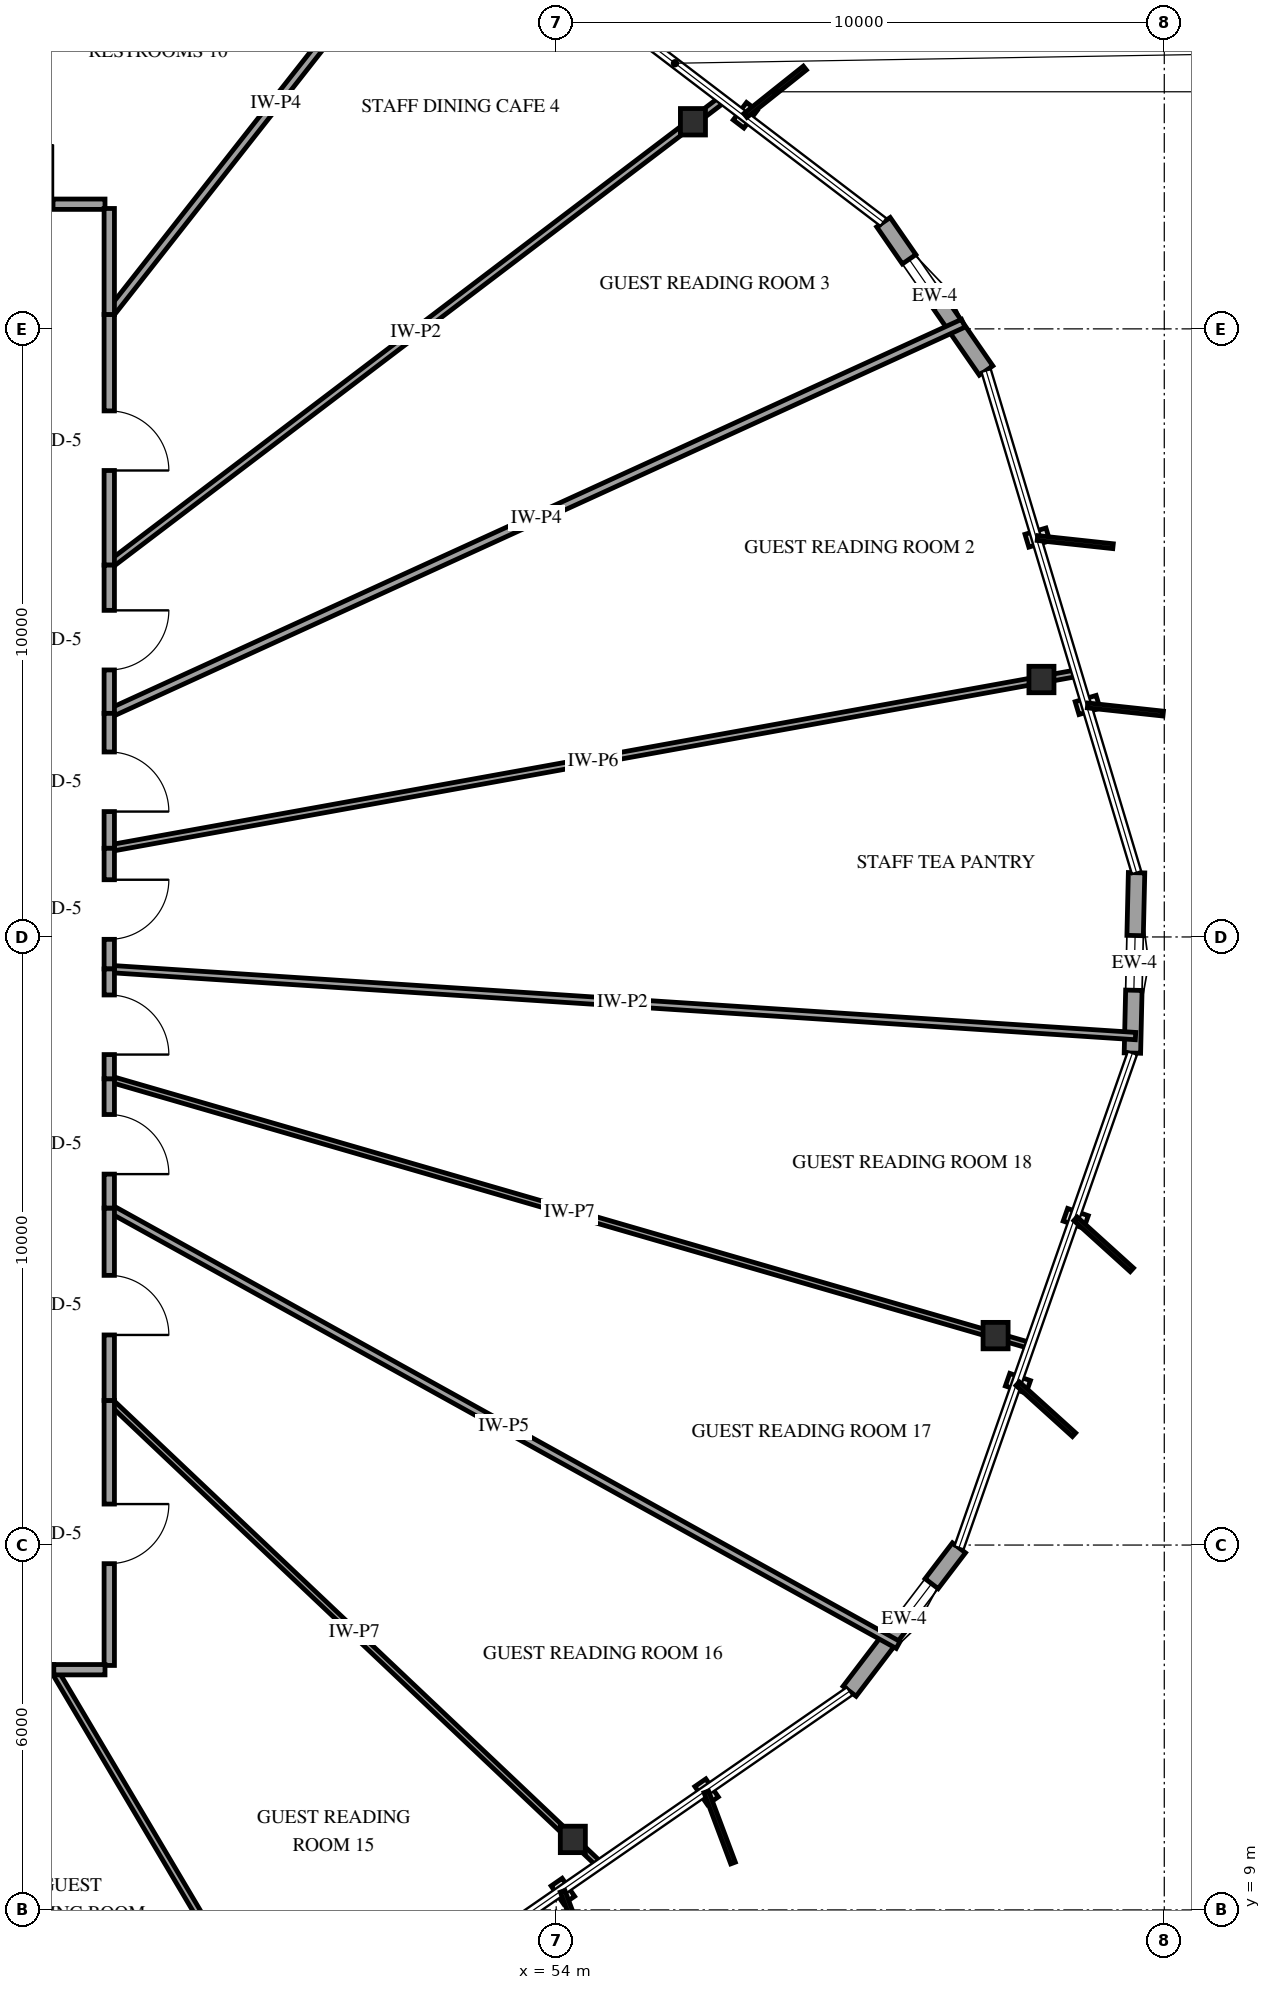
"""IFC4 building model, lengths in metres.
Left out: names, types, materials, properties, quantities, classifications, styles, units other than length and angle.
Written with IfcOpenShell. Run it as: python <this file> out.ifc"""

import sys

from ifc_helpers import new_model, si_unit, direction, frame, frame_2d, origin, origin_2d, place, context, subcontext, project, spatial, rectangle, i_section, extrude, element, fill, save


model = new_model("IFC4")
c1 = context("Model", 3, precision=1e-05, world=origin(), true_north=direction((0.0, 1.0)))
c2 = subcontext(c1, "Body", "Model", "MODEL_VIEW")
j1 = project(units=[si_unit("LENGTHUNIT", "METRE"), si_unit("PLANEANGLEUNIT", "RADIAN")], contexts=[c1])
p1 = place(None, origin())
s1 = spatial("IfcSite", under=j1, at=p1, CompositionType="ELEMENT")
p2 = place(p1, origin())
s2 = spatial("IfcBuilding", under=s1, at=p2, CompositionType="ELEMENT")
p3 = place(p2, frame((0.0, 0.0, 160.6)))
s3 = spatial("IfcBuildingStorey", under=s2, at=p3, CompositionType="ELEMENT", Elevation=160.6)
for number, where, z_axis, x_axis in (
    (1, (61.98, 29.234, 0.0), (0.0, 0.0, 1.0), (1.0, 0.0, 0.0)),
    (2, (56.249, 38.406, 0.0), (0.0, 0.0, 1.0), (1.0, 0.0, 0.0)),
    (3, (54.274, 10.159, 0.0), (0.0, 0.0, 1.0), (1.0, 0.0, 0.0)),
    (4, (61.226, 18.444, 0.0), (0.0, 0.0, 1.0), (1.0, 0.0, 0.0)),
):
    element("IfcColumn", number, at=place(p3, frame(where, z_axis=z_axis, x_axis=x_axis)), inside=s3, PredefinedType="COLUMN", context=c2, shape_type="SweptSolid", body=[
        extrude(i_section(OverallWidth=0.412, OverallDepth=0.435, WebThickness=0.036, FlangeThickness=0.057, FilletRadius=0.038, at=origin_2d()), origin(), (0.0, 0.0, 1.0), 3.6),
    ])
p4 = place(p3, frame((58.825, 12.595, 0.0), z_axis=(0.0, 0.0, 1.0), x_axis=(0.606288663224, 0.795244652196, 0.0)))
e5 = element("IfcWall", 5, at=p4, inside=s3, PredefinedType="SOLIDWALL", context=c2, shape_type="SweptSolid", body=[
    extrude(rectangle(XDim=2.967, YDim=0.27, at=frame_2d((1.483, 0.0))), origin(), (0.0, 0.0, 1.0), 2.679),
])
p5 = place(p4, frame((1.325, 0.0, 0.75)))
e6 = element("IfcOpeningElement", 6, at=p5, cuts=e5, PredefinedType="OPENING", context=c2, shape_type="SweptSolid", body=[
    extrude(rectangle(XDim=0.9, YDim=1.5, at=frame_2d((0.45, 0.75))), frame((0.0, 0.145, 0.0), z_axis=(0.0, -1.0, 0.0), x_axis=(1.0, 0.0, 0.0)), (0.0, 0.0, 1.0), 0.29),
])
p6 = place(p3, frame((63.476, 23.091, 0.0), z_axis=(0.0, 0.0, 1.0), x_axis=(0.023042941499, 0.999734476172, 0.0)))
e7 = element("IfcWall", 7, at=p6, inside=s3, PredefinedType="SOLIDWALL", context=c2, shape_type="SweptSolid", body=[
    extrude(rectangle(XDim=2.967, YDim=0.27, at=frame_2d((1.483, 0.0))), origin(), (0.0, 0.0, 1.0), 2.679),
])
p7 = place(p6, frame((1.033, 0.0, 0.75)))
e8 = element("IfcOpeningElement", 8, at=p7, cuts=e7, PredefinedType="OPENING", context=c2, shape_type="SweptSolid", body=[
    extrude(rectangle(XDim=0.9, YDim=1.5, at=frame_2d((0.45, 0.75))), frame((0.0, 0.145, 0.0), z_axis=(0.0, -1.0, 0.0), x_axis=(1.0, 0.0, 0.0)), (0.0, 0.0, 1.0), 0.29),
])
p8 = place(p3, frame((61.07, 34.315, 0.0), z_axis=(0.0, 0.0, 1.0), x_axis=(-0.569013104062, 0.822328454698, 0.0)))
e9 = element("IfcWall", 9, at=p8, inside=s3, PredefinedType="SOLIDWALL", context=c2, shape_type="SweptSolid", body=[
    extrude(rectangle(XDim=2.967, YDim=0.27, at=frame_2d((1.483, 0.0))), origin(), (0.0, 0.0, 1.0), 2.679),
])
p9 = place(p8, frame((1.325, 0.0, 0.75)))
e10 = element("IfcOpeningElement", 10, at=p9, cuts=e9, PredefinedType="OPENING", context=c2, shape_type="SweptSolid", body=[
    extrude(rectangle(XDim=0.9, YDim=1.5, at=frame_2d((0.45, 0.75))), frame((0.0, 0.145, 0.0), z_axis=(0.0, -1.0, 0.0), x_axis=(1.0, 0.0, 0.0)), (0.0, 0.0, 1.0), 0.29),
])
p10 = place(p3, frame((63.527, 23.37, 0.0), z_axis=(0.0, 0.0, 1.0), x_axis=(-0.997867350215, 0.065274431247, 0.0)))
e11 = element("IfcWall", 11, at=p10, inside=s3, PredefinedType="PARTITIONING", context=c2, shape_type="SweptSolid", body=[
    extrude(rectangle(XDim=16.913, YDim=0.12, at=frame_2d((8.457, 0.0))), origin(), (0.0, 0.0, 1.0), 3.3),
])
p11 = place(p3, frame((46.65, 26.458, 0.0), z_axis=(0.0, 0.0, 1.0), x_axis=(0.984011648358, 0.178104115326, 0.0)))
e12 = element("IfcWall", 12, at=p11, inside=s3, PredefinedType="PARTITIONING", context=c2, shape_type="SweptSolid", body=[
    extrude(rectangle(XDim=16.17, YDim=0.11, at=frame_2d((8.085, 0.0))), origin(), (0.0, 0.0, 1.0), 2.595),
])
p12 = place(p3, frame((46.65, 22.668, 0.0), z_axis=(0.0, 0.0, 1.0), x_axis=(0.960491510773, -0.278309284308, 0.0)))
e13 = element("IfcWall", 13, at=p12, inside=s3, PredefinedType="PARTITIONING", context=c2, shape_type="SweptSolid", body=[
    extrude(rectangle(XDim=15.763, YDim=0.1, at=frame_2d((7.881, 0.0))), origin(), (0.0, 0.0, 1.0), 3.3),
])
p13 = place(p3, frame((46.65, 28.677, 0.0), z_axis=(0.0, 0.0, 1.0), x_axis=(0.909587862055, 0.415511637866, 0.0)))
e14 = element("IfcWall", 14, at=p13, inside=s3, PredefinedType="PARTITIONING", context=c2, shape_type="SweptSolid", body=[
    extrude(rectangle(XDim=15.441, YDim=0.14, at=frame_2d((7.721, 0.0))), origin(), (0.0, 0.0, 1.0), 3.3),
])
p14 = place(p3, frame((46.65, 20.542, 0.0), z_axis=(0.0, 0.0, 1.0), x_axis=(0.874793288303, -0.484496339244, 0.0)))
e15 = element("IfcWall", 15, at=p14, inside=s3, PredefinedType="PARTITIONING", context=c2, shape_type="SweptSolid", body=[
    extrude(rectangle(XDim=14.83, YDim=0.13, at=frame_2d((7.415, 0.0))), origin(), (0.0, 0.0, 1.0), 3.3),
])
p15 = place(p3, frame((46.65, 31.115, 0.0), z_axis=(0.0, 0.0, 1.0), x_axis=(0.796320074683, 0.604875473678, 0.0)))
e16 = element("IfcWall", 16, at=p15, inside=s3, PredefinedType="PARTITIONING", context=c2, shape_type="SweptSolid", body=[
    extrude(rectangle(XDim=12.662, YDim=0.12, at=frame_2d((6.331, 0.0))), origin(), (0.0, 0.0, 1.0), 3.3),
])
p16 = place(p3, frame((46.65, 17.378, 0.0), z_axis=(0.0, 0.0, 1.0), x_axis=(0.726135317292, -0.687551816943, 0.0)))
e17 = element("IfcWall", 17, at=p16, inside=s3, PredefinedType="PARTITIONING", context=c2, shape_type="SweptSolid", body=[
    extrude(rectangle(XDim=11.099, YDim=0.1, at=frame_2d((5.549, 0.0))), origin(), (0.0, 0.0, 1.0), 2.595),
])
p17 = place(p3, frame((46.65, 35.237, 0.0), z_axis=(0.0, 0.0, 1.0), x_axis=(0.618157544568, 0.786054228469, 0.0)))
e18 = element("IfcWall", 18, at=p17, inside=s3, PredefinedType="PARTITIONING", context=c2, shape_type="SweptSolid", body=[
    extrude(rectangle(XDim=8.855, YDim=0.14, at=frame_2d((4.428, 0.0))), origin(), (0.0, 0.0, 1.0), 2.678),
])
p18 = place(p3, frame((45.738, 12.95, 0.0), z_axis=(0.0, 0.0, 1.0), x_axis=(0.50979858573, -0.860293788184, 0.0)))
e19 = element("IfcWall", 19, at=p18, inside=s3, PredefinedType="PARTITIONING", context=c2, shape_type="SweptSolid", body=[
    extrude(rectangle(XDim=7.036, YDim=0.11, at=frame_2d((3.518, 0.0))), origin(), (0.0, 0.0, 1.0), 2.678),
])
p19 = place(p3, frame((43.86, 37.05, 0.0), z_axis=(0.0, 0.0, 1.0), x_axis=(0.400079710806, 0.916480346217, 0.0)))
e20 = element("IfcWall", 20, at=p19, inside=s3, PredefinedType="PARTITIONING", context=c2, shape_type="SweptSolid", body=[
    extrude(rectangle(XDim=6.534, YDim=0.14, at=frame_2d((3.267, 0.0))), origin(), (0.0, 0.0, 1.0), 2.595),
])
p20 = place(p3, frame((46.65, 17.378, 0.0), z_axis=(0.0, 0.0, 1.0), x_axis=(0.0, -1.0, 0.0)))
e21 = element("IfcWall", 21, at=p20, inside=s3, PredefinedType="PARTITIONING", context=c2, shape_type="SweptSolid", body=[
    extrude(rectangle(XDim=4.358, YDim=0.17, at=frame_2d((2.179, 0.0))), origin(), (0.0, 0.0, 1.0), 3.3),
])
p21 = place(p20, frame((1.704, 0.0, 0.0)))
e22 = element("IfcOpeningElement", 22, at=p21, cuts=e21, PredefinedType="OPENING", context=c2, shape_type="SweptSolid", body=[
    extrude(rectangle(XDim=0.98, YDim=2.15, at=frame_2d((0.49, 1.075))), frame((0.0, 0.095, 0.0), z_axis=(0.0, -1.0, 0.0), x_axis=(1.0, 0.0, 0.0)), (0.0, 0.0, 1.0), 0.19),
])
p22 = place(p3, frame((46.65, 35.237, 0.0), z_axis=(0.0, 0.0, 1.0), x_axis=(0.0, -1.0, 0.0)))
e23 = element("IfcWall", 23, at=p22, inside=s3, PredefinedType="PARTITIONING", context=c2, shape_type="SweptSolid", body=[
    extrude(rectangle(XDim=4.122, YDim=0.17, at=frame_2d((2.061, 0.0))), origin(), (0.0, 0.0, 1.0), 3.3),
])
p23 = place(p22, frame((1.586, 0.0, 0.0)))
e24 = element("IfcOpeningElement", 24, at=p23, cuts=e23, PredefinedType="OPENING", context=c2, shape_type="SweptSolid", body=[
    extrude(rectangle(XDim=0.98, YDim=2.15, at=frame_2d((0.49, 1.075))), frame((0.0, 0.095, 0.0), z_axis=(0.0, -1.0, 0.0), x_axis=(1.0, 0.0, 0.0)), (0.0, 0.0, 1.0), 0.19),
])
p24 = place(p3, frame((46.65, 20.542, 0.0), z_axis=(0.0, 0.0, 1.0), x_axis=(0.0, -1.0, 0.0)))
e25 = element("IfcWall", 25, at=p24, inside=s3, PredefinedType="PARTITIONING", context=c2, shape_type="SweptSolid", body=[
    extrude(rectangle(XDim=3.164, YDim=0.17, at=frame_2d((1.582, 0.0))), origin(), (0.0, 0.0, 1.0), 3.3),
])
p25 = place(p24, frame((1.107, 0.0, 0.0)))
e26 = element("IfcOpeningElement", 26, at=p25, cuts=e25, PredefinedType="OPENING", context=c2, shape_type="SweptSolid", body=[
    extrude(rectangle(XDim=0.98, YDim=2.15, at=frame_2d((0.49, 1.075))), frame((0.0, 0.095, 0.0), z_axis=(0.0, -1.0, 0.0), x_axis=(1.0, 0.0, 0.0)), (0.0, 0.0, 1.0), 0.19),
])
p26 = place(p3, frame((43.86, 37.05, 0.0), z_axis=(0.0, 0.0, 1.0), x_axis=(1.0, 0.0, 0.0)))
e27 = element("IfcWall", 27, at=p26, inside=s3, PredefinedType="PARTITIONING", context=c2, shape_type="SweptSolid", body=[
    extrude(rectangle(XDim=2.72, YDim=0.17, at=frame_2d((1.36, 0.0))), origin(), (0.0, 0.0, 1.0), 3.3),
])
p27 = place(p26, frame((0.885, 0.0, 0.0)))
e28 = element("IfcOpeningElement", 28, at=p27, cuts=e27, PredefinedType="OPENING", context=c2, shape_type="SweptSolid", body=[
    extrude(rectangle(XDim=0.98, YDim=2.15, at=frame_2d((0.49, 1.075))), frame((0.0, 0.095, 0.0), z_axis=(0.0, -1.0, 0.0), x_axis=(1.0, 0.0, 0.0)), (0.0, 0.0, 1.0), 0.19),
])
p28 = place(p3, frame((45.738, 12.95, 0.0), z_axis=(0.0, 0.0, 1.0), x_axis=(-1.0, 0.0, 0.0)))
e29 = element("IfcWall", 29, at=p28, inside=s3, PredefinedType="PARTITIONING", context=c2, shape_type="SweptSolid", body=[
    extrude(rectangle(XDim=2.468, YDim=0.17, at=frame_2d((1.234, 0.0))), origin(), (0.0, 0.0, 1.0), 3.3),
])
p29 = place(p3, frame((46.65, 31.115, 0.0), z_axis=(0.0, 0.0, 1.0), x_axis=(0.0, -1.0, 0.0)))
e30 = element("IfcWall", 30, at=p29, inside=s3, PredefinedType="PARTITIONING", context=c2, shape_type="SweptSolid", body=[
    extrude(rectangle(XDim=2.438, YDim=0.17, at=frame_2d((1.219, 0.0))), origin(), (0.0, 0.0, 1.0), 3.3),
])
p30 = place(p29, frame((0.744, 0.0, 0.0)))
e31 = element("IfcOpeningElement", 31, at=p30, cuts=e30, PredefinedType="OPENING", context=c2, shape_type="SweptSolid", body=[
    extrude(rectangle(XDim=0.98, YDim=2.15, at=frame_2d((0.49, 1.075))), frame((0.0, 0.095, 0.0), z_axis=(0.0, -1.0, 0.0), x_axis=(1.0, 0.0, 0.0)), (0.0, 0.0, 1.0), 0.19),
])
p31 = place(p3, frame((46.65, 28.677, 0.0), z_axis=(0.0, 0.0, 1.0), x_axis=(0.0, -1.0, 0.0)))
e32 = element("IfcWall", 32, at=p31, inside=s3, PredefinedType="PARTITIONING", context=c2, shape_type="SweptSolid", body=[
    extrude(rectangle(XDim=2.219, YDim=0.17, at=frame_2d((1.109, 0.0))), origin(), (0.0, 0.0, 1.0), 3.3),
])
p32 = place(p31, frame((0.635, 0.0, 0.0)))
e33 = element("IfcOpeningElement", 33, at=p32, cuts=e32, PredefinedType="OPENING", context=c2, shape_type="SweptSolid", body=[
    extrude(rectangle(XDim=0.98, YDim=2.15, at=frame_2d((0.49, 1.075))), frame((0.0, 0.095, 0.0), z_axis=(0.0, -1.0, 0.0), x_axis=(1.0, 0.0, 0.0)), (0.0, 0.0, 1.0), 0.19),
])
p33 = place(p3, frame((46.65, 22.668, 0.0), z_axis=(0.0, 0.0, 1.0), x_axis=(0.0, -1.0, 0.0)))
e34 = element("IfcWall", 34, at=p33, inside=s3, PredefinedType="PARTITIONING", context=c2, shape_type="SweptSolid", body=[
    extrude(rectangle(XDim=2.126, YDim=0.17, at=frame_2d((1.063, 0.0))), origin(), (0.0, 0.0, 1.0), 3.3),
])
p34 = place(p33, frame((0.588, 0.0, 0.0)))
e35 = element("IfcOpeningElement", 35, at=p34, cuts=e34, PredefinedType="OPENING", context=c2, shape_type="SweptSolid", body=[
    extrude(rectangle(XDim=0.98, YDim=2.15, at=frame_2d((0.49, 1.075))), frame((0.0, 0.095, 0.0), z_axis=(0.0, -1.0, 0.0), x_axis=(1.0, 0.0, 0.0)), (0.0, 0.0, 1.0), 0.19),
])
p35 = place(p3, frame((46.65, 26.458, 0.0), z_axis=(0.0, 0.0, 1.0), x_axis=(0.0, -1.0, 0.0)))
e36 = element("IfcWall", 36, at=p35, inside=s3, PredefinedType="PARTITIONING", context=c2, shape_type="SweptSolid", body=[
    extrude(rectangle(XDim=1.984, YDim=0.17, at=frame_2d((0.992, 0.0))), origin(), (0.0, 0.0, 1.0), 3.3),
])
p36 = place(p35, frame((0.517, 0.0, 0.0)))
e37 = element("IfcOpeningElement", 37, at=p36, cuts=e36, PredefinedType="OPENING", context=c2, shape_type="SweptSolid", body=[
    extrude(rectangle(XDim=0.98, YDim=2.15, at=frame_2d((0.49, 1.075))), frame((0.0, 0.095, 0.0), z_axis=(0.0, -1.0, 0.0), x_axis=(1.0, 0.0, 0.0)), (0.0, 0.0, 1.0), 0.19),
])
p37 = place(p3, frame((46.65, 24.474, 0.0), z_axis=(0.0, 0.0, 1.0), x_axis=(0.0, -1.0, 0.0)))
e38 = element("IfcWall", 38, at=p37, inside=s3, PredefinedType="PARTITIONING", context=c2, shape_type="SweptSolid", body=[
    extrude(rectangle(XDim=1.806, YDim=0.17, at=frame_2d((0.903, 0.0))), origin(), (0.0, 0.0, 1.0), 3.3),
])
p38 = place(p37, frame((0.428, 0.0, 0.0)))
e39 = element("IfcOpeningElement", 39, at=p38, cuts=e38, PredefinedType="OPENING", context=c2, shape_type="SweptSolid", body=[
    extrude(rectangle(XDim=0.98, YDim=2.15, at=frame_2d((0.49, 1.075))), frame((0.0, 0.095, 0.0), z_axis=(0.0, -1.0, 0.0), x_axis=(1.0, 0.0, 0.0)), (0.0, 0.0, 1.0), 0.19),
])
p39 = place(p3, frame((46.65, 36.98, 0.0), z_axis=(0.0, 0.0, 1.0), x_axis=(0.0, -1.0, 0.0)))
e40 = element("IfcWall", 40, at=p39, inside=s3, PredefinedType="PARTITIONING", context=c2, shape_type="SweptSolid", body=[
    extrude(rectangle(XDim=1.743, YDim=0.17, at=frame_2d((0.872, 0.0))), origin(), (0.0, 0.0, 1.0), 3.3),
])
p40 = place(p3, frame((46.58, 12.95, 0.0), z_axis=(0.0, 0.0, 1.0), x_axis=(-1.0, 0.0, 0.0)))
e41 = element("IfcWall", 41, at=p40, inside=s3, PredefinedType="PARTITIONING", context=c2, shape_type="SweptSolid", body=[
    extrude(rectangle(XDim=0.842, YDim=0.17, at=frame_2d((0.421, 0.0))), origin(), (0.0, 0.0, 1.0), 3.3),
])
p41 = place(p5, origin())
e42 = element("IfcWindow", 42, at=p41, inside=s3, PartitioningType="SINGLE_PANEL", PredefinedType="WINDOW", context=c2, shape_type="SweptSolid", body=[
    extrude(rectangle(XDim=0.9, YDim=1.5, at=frame_2d((0.45, 0.75))), frame((0.0, 0.03, 0.0), z_axis=(0.0, -1.0, 0.0), x_axis=(1.0, 0.0, 0.0)), (0.0, 0.0, 1.0), 0.06),
])
fill(e6, e42)
p42 = place(p7, origin())
e43 = element("IfcWindow", 43, at=p42, inside=s3, PartitioningType="SINGLE_PANEL", PredefinedType="WINDOW", context=c2, shape_type="SweptSolid", body=[
    extrude(rectangle(XDim=0.9, YDim=1.5, at=frame_2d((0.45, 0.75))), frame((0.0, 0.03, 0.0), z_axis=(0.0, -1.0, 0.0), x_axis=(1.0, 0.0, 0.0)), (0.0, 0.0, 1.0), 0.06),
])
fill(e8, e43)
p43 = place(p9, origin())
e44 = element("IfcWindow", 44, at=p43, inside=s3, PartitioningType="SINGLE_PANEL", PredefinedType="WINDOW", context=c2, shape_type="SweptSolid", body=[
    extrude(rectangle(XDim=0.9, YDim=1.5, at=frame_2d((0.45, 0.75))), frame((0.0, 0.03, 0.0), z_axis=(0.0, -1.0, 0.0), x_axis=(1.0, 0.0, 0.0)), (0.0, 0.0, 1.0), 0.06),
])
fill(e10, e44)
p44 = place(p21, origin())
e45 = element("IfcDoor", 45, at=p44, inside=s3, OperationType="SINGLE_SWING_LEFT", PredefinedType="DOOR", context=c2, shape_type="SweptSolid", body=[
    extrude(rectangle(XDim=0.98, YDim=2.15, at=frame_2d((0.49, 1.075))), frame((0.0, 0.025, 0.0), z_axis=(0.0, -1.0, 0.0), x_axis=(1.0, 0.0, 0.0)), (0.0, 0.0, 1.0), 0.05),
])
fill(e22, e45)
p45 = place(p23, origin())
e46 = element("IfcDoor", 46, at=p45, inside=s3, OperationType="SINGLE_SWING_RIGHT", PredefinedType="DOOR", context=c2, shape_type="SweptSolid", body=[
    extrude(rectangle(XDim=0.98, YDim=2.15, at=frame_2d((0.49, 1.075))), frame((0.0, 0.025, 0.0), z_axis=(0.0, -1.0, 0.0), x_axis=(1.0, 0.0, 0.0)), (0.0, 0.0, 1.0), 0.05),
])
fill(e24, e46)
p46 = place(p25, origin())
e47 = element("IfcDoor", 47, at=p46, inside=s3, OperationType="SINGLE_SWING_RIGHT", PredefinedType="DOOR", context=c2, shape_type="SweptSolid", body=[
    extrude(rectangle(XDim=0.98, YDim=2.15, at=frame_2d((0.49, 1.075))), frame((0.0, 0.025, 0.0), z_axis=(0.0, -1.0, 0.0), x_axis=(1.0, 0.0, 0.0)), (0.0, 0.0, 1.0), 0.05),
])
fill(e26, e47)
p47 = place(p27, origin())
e48 = element("IfcDoor", 48, at=p47, inside=s3, OperationType="SINGLE_SWING_RIGHT", PredefinedType="DOOR", context=c2, shape_type="SweptSolid", body=[
    extrude(rectangle(XDim=0.98, YDim=2.15, at=frame_2d((0.49, 1.075))), frame((0.0, 0.025, 0.0), z_axis=(0.0, -1.0, 0.0), x_axis=(1.0, 0.0, 0.0)), (0.0, 0.0, 1.0), 0.05),
])
fill(e28, e48)
p48 = place(p30, origin())
e49 = element("IfcDoor", 49, at=p48, inside=s3, OperationType="SINGLE_SWING_LEFT", PredefinedType="DOOR", context=c2, shape_type="SweptSolid", body=[
    extrude(rectangle(XDim=0.98, YDim=2.15, at=frame_2d((0.49, 1.075))), frame((0.0, 0.025, 0.0), z_axis=(0.0, -1.0, 0.0), x_axis=(1.0, 0.0, 0.0)), (0.0, 0.0, 1.0), 0.05),
])
fill(e31, e49)
p49 = place(p32, origin())
e50 = element("IfcDoor", 50, at=p49, inside=s3, OperationType="SINGLE_SWING_RIGHT", PredefinedType="DOOR", context=c2, shape_type="SweptSolid", body=[
    extrude(rectangle(XDim=0.98, YDim=2.15, at=frame_2d((0.49, 1.075))), frame((0.0, 0.025, 0.0), z_axis=(0.0, -1.0, 0.0), x_axis=(1.0, 0.0, 0.0)), (0.0, 0.0, 1.0), 0.05),
])
fill(e33, e50)
p50 = place(p34, origin())
e51 = element("IfcDoor", 51, at=p50, inside=s3, OperationType="SINGLE_SWING_RIGHT", PredefinedType="DOOR", context=c2, shape_type="SweptSolid", body=[
    extrude(rectangle(XDim=0.98, YDim=2.15, at=frame_2d((0.49, 1.075))), frame((0.0, 0.025, 0.0), z_axis=(0.0, -1.0, 0.0), x_axis=(1.0, 0.0, 0.0)), (0.0, 0.0, 1.0), 0.05),
])
fill(e35, e51)
p51 = place(p36, origin())
e52 = element("IfcDoor", 52, at=p51, inside=s3, OperationType="SINGLE_SWING_LEFT", PredefinedType="DOOR", context=c2, shape_type="SweptSolid", body=[
    extrude(rectangle(XDim=0.98, YDim=2.15, at=frame_2d((0.49, 1.075))), frame((0.0, 0.025, 0.0), z_axis=(0.0, -1.0, 0.0), x_axis=(1.0, 0.0, 0.0)), (0.0, 0.0, 1.0), 0.05),
])
fill(e37, e52)
p52 = place(p38, origin())
e53 = element("IfcDoor", 53, at=p52, inside=s3, OperationType="SINGLE_SWING_RIGHT", PredefinedType="DOOR", context=c2, shape_type="SweptSolid", body=[
    extrude(rectangle(XDim=0.98, YDim=2.15, at=frame_2d((0.49, 1.075))), frame((0.0, 0.025, 0.0), z_axis=(0.0, -1.0, 0.0), x_axis=(1.0, 0.0, 0.0)), (0.0, 0.0, 1.0), 0.05),
])
fill(e39, e53)
save(model, sys.argv[1])
